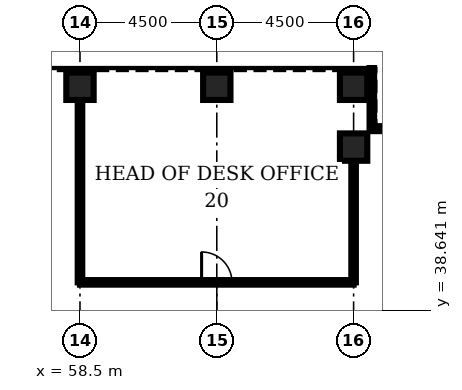
"""IFC4 building model, lengths in metres.
Left out: names, types, materials, properties, quantities, classifications, styles, units other than length and angle.
Written with IfcOpenShell. Run it as: python <this file> out.ifc"""

import sys

from ifc_helpers import new_model, si_unit, direction, frame, frame_2d, origin, origin_2d, place, context, subcontext, project, spatial, rectangle, hollow_rectangle, extrude, element, fill, save


model = new_model("IFC4")
c1 = context("Model", 3, precision=1e-05, world=origin(), true_north=direction((0.0, 1.0)))
c2 = subcontext(c1, "Body", "Model", "MODEL_VIEW")
j1 = project(units=[si_unit("LENGTHUNIT", "METRE"), si_unit("PLANEANGLEUNIT", "RADIAN")], contexts=[c1])
p1 = place(None, origin())
s1 = spatial("IfcSite", under=j1, at=p1, CompositionType="ELEMENT")
p2 = place(p1, origin())
s2 = spatial("IfcBuilding", under=s1, at=p2, CompositionType="ELEMENT")
p3 = place(p2, frame((0.0, 0.0, 54.5)))
s3 = spatial("IfcBuildingStorey", under=s2, at=p3, CompositionType="ELEMENT", Elevation=54.5)
for number, where, z_axis, x_axis in (
    (1, (67.5, 44.0, 0.0), (0.0, 0.0, 1.0), (0.0, 1.0, 0.0)),
    (2, (67.5, 46.0, 0.0), (0.0, 0.0, 1.0), (0.0, 1.0, 0.0)),
    (3, (63.0, 46.0, 0.0), (0.0, 0.0, 1.0), (0.0, 1.0, 0.0)),
    (4, (58.5, 46.0, 0.0), (0.0, 0.0, 1.0), (0.0, 1.0, 0.0)),
):
    element("IfcColumn", number, at=place(p3, frame(where, z_axis=z_axis, x_axis=x_axis)), inside=s3, PredefinedType="COLUMN", context=c2, shape_type="SweptSolid", body=[
        extrude(hollow_rectangle(XDim=0.9, YDim=0.9, WallThickness=0.12, at=origin_2d()), origin(), (0.0, 0.0, 1.0), 4.5),
    ])
p4 = place(p3, frame((58.5, 39.55, 0.0), z_axis=(0.0, 0.0, 1.0), x_axis=(1.0, 0.0, 0.0)))
e5 = element("IfcWall", 5, at=p4, inside=s3, PredefinedType="PARTITIONING", context=c2, shape_type="SweptSolid", body=[
    extrude(rectangle(XDim=9.0, YDim=0.15, at=frame_2d((4.5, 0.0))), origin(), (0.0, 0.0, 1.0), 3.0),
])
p5 = place(p4, frame((4.0, 0.0, 0.0)))
e6 = element("IfcOpeningElement", 6, at=p5, cuts=e5, PredefinedType="OPENING", context=c2, shape_type="SweptSolid", body=[
    extrude(rectangle(XDim=1.0, YDim=2.1, at=frame_2d((0.5, 1.05))), frame((0.0, 0.085, 0.0), z_axis=(0.0, -1.0, 0.0), x_axis=(1.0, 0.0, 0.0)), (0.0, 0.0, 1.0), 0.17),
])
p6 = place(p3, frame((58.5, 39.55, 0.0), z_axis=(0.0, 0.0, 1.0), x_axis=(0.0, 1.0, 0.0)))
e7 = element("IfcWall", 7, at=p6, inside=s3, PredefinedType="PARTITIONING", context=c2, shape_type="SweptSolid", body=[
    extrude(rectangle(XDim=6.0, YDim=0.15, at=frame_2d((3.0, 0.0))), origin(), (0.0, 0.0, 1.0), 3.0),
])
p7 = place(p3, frame((67.5, 39.55, 0.0), z_axis=(0.0, 0.0, 1.0), x_axis=(0.0, 1.0, 0.0)))
e8 = element("IfcWall", 8, at=p7, inside=s3, PredefinedType="PARTITIONING", context=c2, shape_type="SweptSolid", body=[
    extrude(rectangle(XDim=4.0, YDim=0.15, at=frame_2d((2.0, 0.0))), origin(), (0.0, 0.0, 1.0), 3.0),
])
p8 = place(p3, frame((70.35, 44.6, 0.0), z_axis=(0.0, 0.0, 1.0), x_axis=(-1.0, 0.0, 0.0)))
e9 = element("IfcWall", 9, at=p8, inside=s3, PredefinedType="ELEMENTEDWALL", context=c2, shape_type="SweptSolid", body=[
    extrude(rectangle(XDim=2.25, YDim=0.15, at=frame_2d((1.125, 0.0))), origin(), (0.0, 0.0, 1.0), 4.32),
])
p9 = place(p3, frame((68.1, 44.6, 0.0), z_axis=(0.0, 0.0, 1.0), x_axis=(0.0, 1.0, 0.0)))
e10 = element("IfcWall", 10, at=p9, inside=s3, PredefinedType="ELEMENTEDWALL", context=c2, shape_type="SweptSolid", body=[
    extrude(rectangle(XDim=2.0, YDim=0.15, at=frame_2d((1.0, 0.0))), origin(), (0.0, 0.0, 1.0), 4.32),
])
p10 = place(p5, origin())
e11 = element("IfcDoor", 11, at=p10, inside=s3, OperationType="SINGLE_SWING_LEFT", PredefinedType="DOOR", context=c2, shape_type="SweptSolid", body=[
    extrude(rectangle(XDim=1.0, YDim=2.1, at=frame_2d((0.5, 1.05))), frame((0.0, 0.025, 0.0), z_axis=(0.0, -1.0, 0.0), x_axis=(1.0, 0.0, 0.0)), (0.0, 0.0, 1.0), 0.05),
])
fill(e6, e11)
save(model, sys.argv[1])
